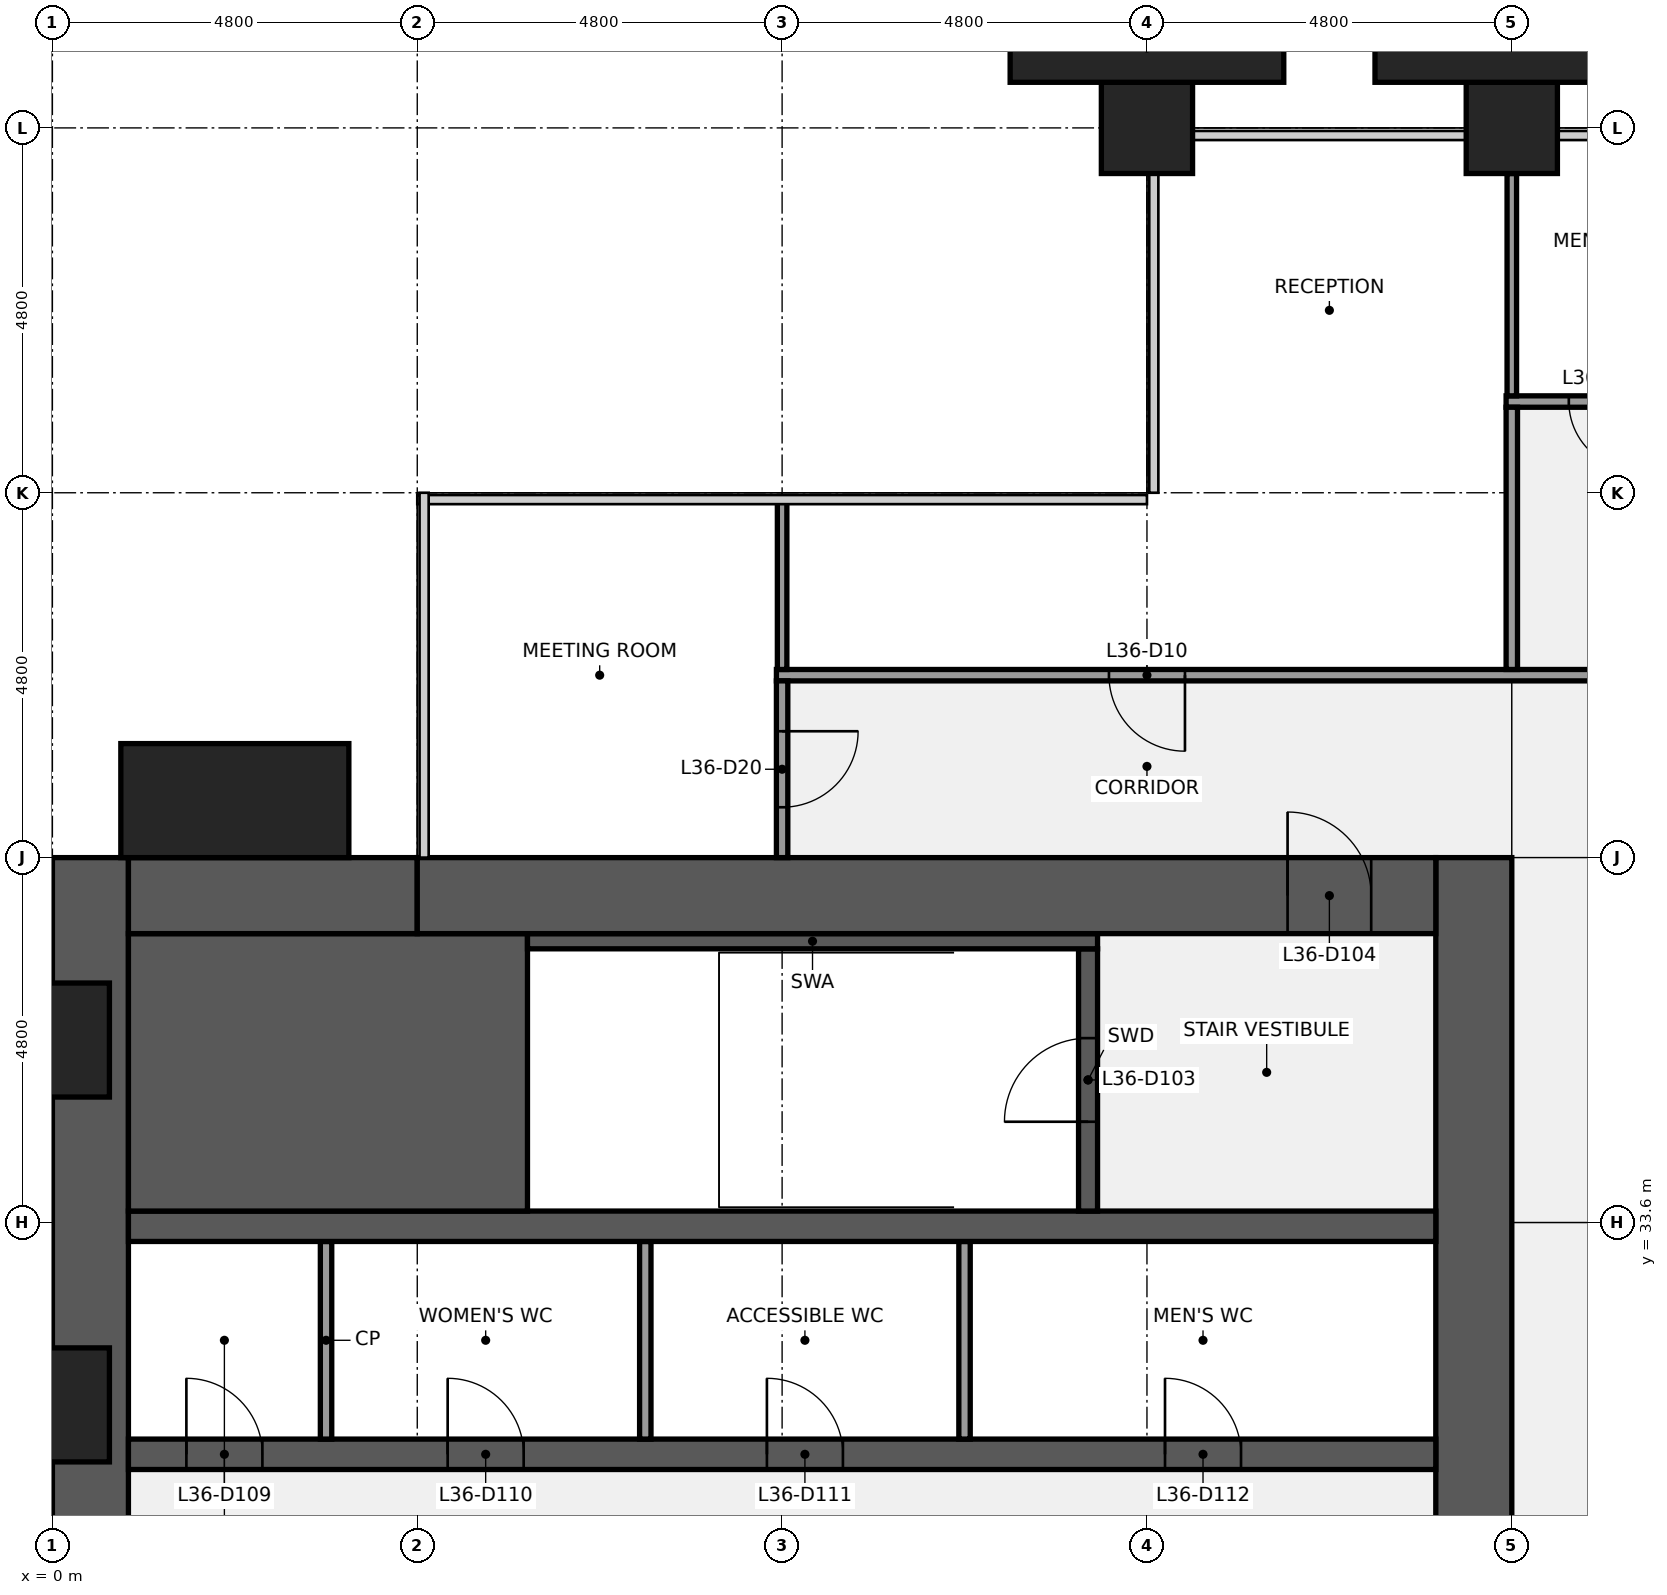
"""IFC4 building model, lengths in metres.
Left out: names, types, materials, properties, quantities, classifications, styles, units other than length and angle.
Written with IfcOpenShell. Run it as: python <this file> out.ifc"""

import sys

from ifc_helpers import new_model, si_unit, direction, frame, frame_2d, origin, origin_2d, place, context, subcontext, project, spatial, rectangle, extrude, element, fill, save


model = new_model("IFC4")
c1 = context("Model", 3, precision=1e-05, world=origin(), true_north=direction((0.0, 1.0)))
c2 = subcontext(c1, "Body", "Model", "MODEL_VIEW")
j1 = project(units=[si_unit("LENGTHUNIT", "METRE"), si_unit("PLANEANGLEUNIT", "RADIAN")], contexts=[c1])
p1 = place(None, origin())
s1 = spatial("IfcSite", under=j1, at=p1, CompositionType="ELEMENT")
p2 = place(p1, origin())
s2 = spatial("IfcBuilding", under=s1, at=p2, CompositionType="ELEMENT")
p3 = place(p2, frame((0.0, 0.0, 164.1)))
s3 = spatial("IfcBuildingStorey", under=s2, at=p3, CompositionType="ELEMENT", Elevation=164.1)
for number, where, z_axis, x_axis in (
    (1, (14.4, 48.0, 0.0), (0.0, 0.0, 1.0), (1.0, 0.0, 0.0)),
    (2, (19.2, 48.0, 0.0), (0.0, 0.0, 1.0), (1.0, 0.0, 0.0)),
):
    element("IfcColumn", number, at=place(p3, frame(where, z_axis=z_axis, x_axis=x_axis)), inside=s3, PredefinedType="COLUMN", context=c2, shape_type="SweptSolid", body=[
        extrude(rectangle(XDim=1.2, YDim=1.2, at=origin_2d()), origin(), (0.0, 0.0, 1.0), 4.0),
    ])
p4 = place(p3, frame((0.5, 9.6, 0.0), z_axis=(0.0, 0.0, 1.0), x_axis=(0.0, 1.0, 0.0)))
e3 = element("IfcWall", 3, at=p4, inside=s3, PredefinedType="SHEAR", context=c2, shape_type="SweptSolid", body=[
    extrude(rectangle(XDim=28.8, YDim=1.0, at=frame_2d((14.4, 0.0))), origin(), (0.0, 0.0, 1.0), 3.84),
])
p5 = place(p4, frame((8.85, 0.0, 0.9)))
e4 = element("IfcOpeningElement", 4, at=p5, cuts=e3, PredefinedType="OPENING", context=c2, shape_type="SweptSolid", body=[
    extrude(rectangle(XDim=1.5, YDim=1.5, at=frame_2d((0.75, 0.75))), frame((0.0, 0.51, 0.0), z_axis=(0.0, -1.0, 0.0), x_axis=(1.0, 0.0, 0.0)), (0.0, 0.0, 1.0), 1.02),
])
p6 = place(p4, frame((18.45, 0.0, 0.9)))
e5 = element("IfcOpeningElement", 5, at=p6, cuts=e3, PredefinedType="OPENING", context=c2, shape_type="SweptSolid", body=[
    extrude(rectangle(XDim=1.5, YDim=1.5, at=frame_2d((0.75, 0.75))), frame((0.0, 0.51, 0.0), z_axis=(0.0, -1.0, 0.0), x_axis=(1.0, 0.0, 0.0)), (0.0, 0.0, 1.0), 1.02),
])
p7 = place(p3, frame((18.7, 38.4, 0.0), z_axis=(0.0, 0.0, 1.0), x_axis=(0.0, -1.0, 0.0)))
e6 = element("IfcWall", 6, at=p7, inside=s3, PredefinedType="SHEAR", context=c2, shape_type="SweptSolid", body=[
    extrude(rectangle(XDim=28.8, YDim=1.0, at=frame_2d((14.4, 0.0))), origin(), (0.0, 0.0, 1.0), 3.84),
])
p8 = place(p7, frame((18.3, 0.0, 0.0)))
e7 = element("IfcOpeningElement", 7, at=p8, cuts=e6, PredefinedType="OPENING", context=c2, shape_type="SweptSolid", body=[
    extrude(rectangle(XDim=1.8, YDim=2.1, at=frame_2d((0.9, 1.05))), frame((0.0, 0.51, 0.0), z_axis=(0.0, -1.0, 0.0), x_axis=(1.0, 0.0, 0.0)), (0.0, 0.0, 1.0), 1.02),
])
p9 = place(p7, frame((8.7, 0.0, 0.0)))
e8 = element("IfcOpeningElement", 8, at=p9, cuts=e6, PredefinedType="OPENING", context=c2, shape_type="SweptSolid", body=[
    extrude(rectangle(XDim=1.8, YDim=2.1, at=frame_2d((0.9, 1.05))), frame((0.0, 0.51, 0.0), z_axis=(0.0, -1.0, 0.0), x_axis=(1.0, 0.0, 0.0)), (0.0, 0.0, 1.0), 1.02),
])
p10 = place(p3, frame((1.0, 30.55, 0.0), z_axis=(0.0, 0.0, 1.0), x_axis=(1.0, 0.0, 0.0)))
e9 = element("IfcWall", 9, at=p10, inside=s3, PredefinedType="SHEAR", context=c2, shape_type="SweptSolid", body=[
    extrude(rectangle(XDim=17.2, YDim=0.4, at=frame_2d((8.6, 0.0))), origin(), (0.0, 0.0, 1.0), 3.84),
])
p11 = place(p10, frame((0.762, 0.0, 0.0)))
e10 = element("IfcOpeningElement", 10, at=p11, cuts=e9, PredefinedType="OPENING", context=c2, shape_type="SweptSolid", body=[
    extrude(rectangle(XDim=1.0, YDim=2.1, at=frame_2d((0.5, 1.05))), frame((0.0, 0.21, 0.0), z_axis=(0.0, -1.0, 0.0), x_axis=(1.0, 0.0, 0.0)), (0.0, 0.0, 1.0), 0.42),
])
p12 = place(p10, frame((4.2, 0.0, 0.0)))
e11 = element("IfcOpeningElement", 11, at=p12, cuts=e9, PredefinedType="OPENING", context=c2, shape_type="SweptSolid", body=[
    extrude(rectangle(XDim=1.0, YDim=2.1, at=frame_2d((0.5, 1.05))), frame((0.0, 0.21, 0.0), z_axis=(0.0, -1.0, 0.0), x_axis=(1.0, 0.0, 0.0)), (0.0, 0.0, 1.0), 0.42),
])
p13 = place(p10, frame((8.4, 0.0, 0.0)))
e12 = element("IfcOpeningElement", 12, at=p13, cuts=e9, PredefinedType="OPENING", context=c2, shape_type="SweptSolid", body=[
    extrude(rectangle(XDim=1.0, YDim=2.1, at=frame_2d((0.5, 1.05))), frame((0.0, 0.21, 0.0), z_axis=(0.0, -1.0, 0.0), x_axis=(1.0, 0.0, 0.0)), (0.0, 0.0, 1.0), 0.42),
])
p14 = place(p10, frame((13.637, 0.0, 0.0)))
e13 = element("IfcOpeningElement", 13, at=p14, cuts=e9, PredefinedType="OPENING", context=c2, shape_type="SweptSolid", body=[
    extrude(rectangle(XDim=1.0, YDim=2.1, at=frame_2d((0.5, 1.05))), frame((0.0, 0.21, 0.0), z_axis=(0.0, -1.0, 0.0), x_axis=(1.0, 0.0, 0.0)), (0.0, 0.0, 1.0), 0.42),
])
for number, where, z_axis, x_axis in (
    (14, (3.6, 30.75, 0.0), (0.0, 0.0, 1.0), (0.0, 1.0, 0.0)),
    (15, (7.8, 30.75, 0.0), (0.0, 0.0, 1.0), (0.0, 1.0, 0.0)),
    (16, (12.0, 30.75, 0.0), (0.0, 0.0, 1.0), (0.0, 1.0, 0.0)),
):
    element("IfcWall", number, at=place(p3, frame(where, z_axis=z_axis, x_axis=x_axis)), inside=s3, PredefinedType="PARTITIONING", context=c2, shape_type="SweptSolid", body=[
        extrude(rectangle(XDim=2.6, YDim=0.15, at=frame_2d((1.3, 0.0))), origin(), (0.0, 0.0, 1.0), 3.84),
    ])
p15 = place(p3, frame((1.0, 33.55, 0.0), z_axis=(0.0, 0.0, 1.0), x_axis=(1.0, 0.0, 0.0)))
e17 = element("IfcWall", 17, at=p15, inside=s3, PredefinedType="SHEAR", context=c2, shape_type="SweptSolid", body=[
    extrude(rectangle(XDim=17.2, YDim=0.4, at=frame_2d((8.6, 0.0))), origin(), (0.0, 0.0, 1.0), 3.84),
])
p16 = place(p3, frame((1.0, 35.575, 0.0), z_axis=(0.0, 0.0, 1.0), x_axis=(1.0, 0.0, 0.0)))
e18 = element("IfcWall", 18, at=p16, inside=s3, PredefinedType="SHEAR", context=c2, shape_type="SweptSolid", body=[
    extrude(rectangle(XDim=5.25, YDim=3.65, at=frame_2d((2.625, 0.0))), origin(), (0.0, 0.0, 1.0), 3.84),
])
p17 = place(p3, frame((13.625, 33.75, 0.0), z_axis=(0.0, 0.0, 1.0), x_axis=(0.0, 1.0, 0.0)))
e19 = element("IfcWall", 19, at=p17, inside=s3, PredefinedType="SHEAR", context=c2, shape_type="SweptSolid", body=[
    extrude(rectangle(XDim=3.45, YDim=0.25, at=frame_2d((1.725, 0.0))), origin(), (0.0, 0.0, 1.0), 3.84),
])
p18 = place(p17, frame((1.175, 0.0, 0.0)))
e20 = element("IfcOpeningElement", 20, at=p18, cuts=e19, PredefinedType="OPENING", context=c2, shape_type="SweptSolid", body=[
    extrude(rectangle(XDim=1.1, YDim=2.1, at=frame_2d((0.55, 1.05))), frame((0.0, 0.135, 0.0), z_axis=(0.0, -1.0, 0.0), x_axis=(1.0, 0.0, 0.0)), (0.0, 0.0, 1.0), 0.27),
])
p19 = place(p3, frame((6.25, 37.3, 0.0), z_axis=(0.0, 0.0, 1.0), x_axis=(1.0, 0.0, 0.0)))
e21 = element("IfcWall", 21, at=p19, inside=s3, PredefinedType="SHEAR", context=c2, shape_type="SweptSolid", body=[
    extrude(rectangle(XDim=7.5, YDim=0.2, at=frame_2d((3.75, 0.0))), origin(), (0.0, 0.0, 1.0), 3.84),
])
p20 = place(p3, frame((1.0, 37.9, 0.0), z_axis=(0.0, 0.0, 1.0), x_axis=(1.0, 0.0, 0.0)))
e22 = element("IfcWall", 22, at=p20, inside=s3, PredefinedType="SHEAR", context=c2, shape_type="SweptSolid", body=[
    extrude(rectangle(XDim=3.8, YDim=1.0, at=frame_2d((1.9, 0.0))), origin(), (0.0, 0.0, 1.0), 3.84),
])
p21 = place(p3, frame((4.8, 37.9, 0.0), z_axis=(0.0, 0.0, 1.0), x_axis=(1.0, 0.0, 0.0)))
e23 = element("IfcWall", 23, at=p21, inside=s3, PredefinedType="SHEAR", context=c2, shape_type="SweptSolid", body=[
    extrude(rectangle(XDim=13.4, YDim=1.0, at=frame_2d((6.7, 0.0))), origin(), (0.0, 0.0, 1.0), 3.84),
])
p22 = place(p21, frame((11.45, 0.0, 0.0)))
e24 = element("IfcOpeningElement", 24, at=p22, cuts=e23, PredefinedType="OPENING", context=c2, shape_type="SweptSolid", body=[
    extrude(rectangle(XDim=1.1, YDim=2.1, at=frame_2d((0.55, 1.05))), frame((0.0, 0.51, 0.0), z_axis=(0.0, -1.0, 0.0), x_axis=(1.0, 0.0, 0.0)), (0.0, 0.0, 1.0), 1.02),
])
p23 = place(p3, frame((9.525, 40.8, 0.0), z_axis=(0.0, 0.0, 1.0), x_axis=(1.0, 0.0, 0.0)))
e25 = element("IfcWall", 25, at=p23, inside=s3, PredefinedType="PARTITIONING", context=c2, shape_type="SweptSolid", body=[
    extrude(rectangle(XDim=38.375, YDim=0.15, at=frame_2d((19.188, 0.0))), origin(), (0.0, 0.0, 1.0), 2.936),
])
p24 = place(p23, frame((4.375, 0.0, 0.0)))
e26 = element("IfcOpeningElement", 26, at=p24, cuts=e25, PredefinedType="OPENING", context=c2, shape_type="SweptSolid", body=[
    extrude(rectangle(XDim=1.0, YDim=2.1, at=frame_2d((0.5, 1.05))), frame((0.0, 0.085, 0.0), z_axis=(0.0, -1.0, 0.0), x_axis=(1.0, 0.0, 0.0)), (0.0, 0.0, 1.0), 0.17),
])
p25 = place(p23, frame((12.775, 0.0, 0.0)))
e27 = element("IfcOpeningElement", 27, at=p25, cuts=e25, PredefinedType="OPENING", context=c2, shape_type="SweptSolid", body=[
    extrude(rectangle(XDim=1.0, YDim=2.1, at=frame_2d((0.5, 1.05))), frame((0.0, 0.085, 0.0), z_axis=(0.0, -1.0, 0.0), x_axis=(1.0, 0.0, 0.0)), (0.0, 0.0, 1.0), 0.17),
])
p26 = place(p23, frame((17.575, 0.0, 0.0)))
e28 = element("IfcOpeningElement", 28, at=p26, cuts=e25, PredefinedType="OPENING", context=c2, shape_type="SweptSolid", body=[
    extrude(rectangle(XDim=1.0, YDim=2.1, at=frame_2d((0.5, 1.05))), frame((0.0, 0.085, 0.0), z_axis=(0.0, -1.0, 0.0), x_axis=(1.0, 0.0, 0.0)), (0.0, 0.0, 1.0), 0.17),
])
p27 = place(p23, frame((19.975, 0.0, 0.0)))
e29 = element("IfcOpeningElement", 29, at=p27, cuts=e25, PredefinedType="OPENING", context=c2, shape_type="SweptSolid", body=[
    extrude(rectangle(XDim=1.0, YDim=2.1, at=frame_2d((0.5, 1.05))), frame((0.0, 0.085, 0.0), z_axis=(0.0, -1.0, 0.0), x_axis=(1.0, 0.0, 0.0)), (0.0, 0.0, 1.0), 0.17),
])
p28 = place(p23, frame((23.575, 0.0, 0.0)))
e30 = element("IfcOpeningElement", 30, at=p28, cuts=e25, PredefinedType="OPENING", context=c2, shape_type="SweptSolid", body=[
    extrude(rectangle(XDim=1.0, YDim=2.1, at=frame_2d((0.5, 1.05))), frame((0.0, 0.085, 0.0), z_axis=(0.0, -1.0, 0.0), x_axis=(1.0, 0.0, 0.0)), (0.0, 0.0, 1.0), 0.17),
])
p29 = place(p23, frame((27.175, 0.0, 0.0)))
e31 = element("IfcOpeningElement", 31, at=p29, cuts=e25, PredefinedType="OPENING", context=c2, shape_type="SweptSolid", body=[
    extrude(rectangle(XDim=1.0, YDim=2.1, at=frame_2d((0.5, 1.05))), frame((0.0, 0.085, 0.0), z_axis=(0.0, -1.0, 0.0), x_axis=(1.0, 0.0, 0.0)), (0.0, 0.0, 1.0), 0.17),
])
p30 = place(p23, frame((33.125, 0.0, 0.0)))
e32 = element("IfcOpeningElement", 32, at=p30, cuts=e25, PredefinedType="OPENING", context=c2, shape_type="SweptSolid", body=[
    extrude(rectangle(XDim=1.0, YDim=2.1, at=frame_2d((0.5, 1.05))), frame((0.0, 0.085, 0.0), z_axis=(0.0, -1.0, 0.0), x_axis=(1.0, 0.0, 0.0)), (0.0, 0.0, 1.0), 0.17),
])
p31 = place(p3, frame((19.125, 44.4, 0.0), z_axis=(0.0, 0.0, 1.0), x_axis=(1.0, 0.0, 0.0)))
e33 = element("IfcWall", 33, at=p31, inside=s3, PredefinedType="PARTITIONING", context=c2, shape_type="SweptSolid", body=[
    extrude(rectangle(XDim=7.35, YDim=0.15, at=frame_2d((3.675, 0.0))), origin(), (0.0, 0.0, 1.0), 2.936),
])
p32 = place(p31, frame((0.825, 0.0, 0.0)))
e34 = element("IfcOpeningElement", 34, at=p32, cuts=e33, PredefinedType="OPENING", context=c2, shape_type="SweptSolid", body=[
    extrude(rectangle(XDim=0.9, YDim=2.1, at=frame_2d((0.45, 1.05))), frame((0.0, 0.085, 0.0), z_axis=(0.0, -1.0, 0.0), x_axis=(1.0, 0.0, 0.0)), (0.0, 0.0, 1.0), 0.17),
])
p33 = place(p31, frame((3.225, 0.0, 0.0)))
e35 = element("IfcOpeningElement", 35, at=p33, cuts=e33, PredefinedType="OPENING", context=c2, shape_type="SweptSolid", body=[
    extrude(rectangle(XDim=0.9, YDim=2.1, at=frame_2d((0.45, 1.05))), frame((0.0, 0.085, 0.0), z_axis=(0.0, -1.0, 0.0), x_axis=(1.0, 0.0, 0.0)), (0.0, 0.0, 1.0), 0.17),
])
p34 = place(p31, frame((5.475, 0.0, 0.0)))
e36 = element("IfcOpeningElement", 36, at=p34, cuts=e33, PredefinedType="OPENING", context=c2, shape_type="SweptSolid", body=[
    extrude(rectangle(XDim=1.2, YDim=2.1, at=frame_2d((0.6, 1.05))), frame((0.0, 0.085, 0.0), z_axis=(0.0, -1.0, 0.0), x_axis=(1.0, 0.0, 0.0)), (0.0, 0.0, 1.0), 0.17),
])
p35 = place(p3, frame((9.6, 40.875, 0.0), z_axis=(0.0, 0.0, 1.0), x_axis=(0.0, 1.0, 0.0)))
e37 = element("IfcWall", 37, at=p35, inside=s3, PredefinedType="PARTITIONING", context=c2, shape_type="SweptSolid", body=[
    extrude(rectangle(XDim=2.225, YDim=0.125, at=frame_2d((1.113, 0.0))), origin(), (0.0, 0.0, 1.0), 2.936),
])
p36 = place(p3, frame((9.6, 38.4, 0.0), z_axis=(0.0, 0.0, 1.0), x_axis=(0.0, 1.0, 0.0)))
e38 = element("IfcWall", 38, at=p36, inside=s3, PredefinedType="PARTITIONING", context=c2, shape_type="SweptSolid", body=[
    extrude(rectangle(XDim=2.325, YDim=0.15, at=frame_2d((1.163, 0.0))), origin(), (0.0, 0.0, 1.0), 2.936),
])
p37 = place(p36, frame((0.663, 0.0, 0.0)))
e39 = element("IfcOpeningElement", 39, at=p37, cuts=e38, PredefinedType="OPENING", context=c2, shape_type="SweptSolid", body=[
    extrude(rectangle(XDim=1.0, YDim=2.1, at=frame_2d((0.5, 1.05))), frame((0.0, 0.085, 0.0), z_axis=(0.0, -1.0, 0.0), x_axis=(1.0, 0.0, 0.0)), (0.0, 0.0, 1.0), 0.17),
])
p38 = place(p3, frame((19.2, 44.475, 0.0), z_axis=(0.0, 0.0, 1.0), x_axis=(0.0, 1.0, 0.0)))
e40 = element("IfcWall", 40, at=p38, inside=s3, PredefinedType="PARTITIONING", context=c2, shape_type="SweptSolid", body=[
    extrude(rectangle(XDim=2.925, YDim=0.125, at=frame_2d((1.462, 0.0))), origin(), (0.0, 0.0, 1.0), 2.936),
])
p39 = place(p3, frame((19.2, 40.875, 0.0), z_axis=(0.0, 0.0, 1.0), x_axis=(0.0, 1.0, 0.0)))
e41 = element("IfcWall", 41, at=p39, inside=s3, PredefinedType="PARTITIONING", context=c2, shape_type="SweptSolid", body=[
    extrude(rectangle(XDim=3.45, YDim=0.15, at=frame_2d((1.725, 0.0))), origin(), (0.0, 0.0, 1.0), 2.936),
])
p40 = place(p3, frame((2.4, 39.15, 0.0), z_axis=(0.0, 0.0, 1.0), x_axis=(1.0, 0.0, 0.0)))
e42 = element("IfcColumn", 42, at=p40, inside=s3, PredefinedType="PILASTER", context=c2, shape_type="SweptSolid", body=[
    extrude(rectangle(XDim=3.0, YDim=1.5, at=origin_2d()), origin(), (0.0, 0.0, 1.0), 4.0),
])
for number, where, z_axis, x_axis in (
    (43, (14.4, 49.05, 0.0), (0.0, 0.0, 1.0), (1.0, 0.0, 0.0)),
    (44, (19.2, 49.05, 0.0), (0.0, 0.0, 1.0), (1.0, 0.0, 0.0)),
):
    element("IfcColumn", number, at=place(p3, frame(where, z_axis=z_axis, x_axis=x_axis)), inside=s3, PredefinedType="PILASTER", context=c2, shape_type="SweptSolid", body=[
        extrude(rectangle(XDim=3.6, YDim=0.9, at=origin_2d()), origin(), (0.0, 0.0, 1.0), 4.0),
    ])
p41 = place(p18, origin())
e45 = element("IfcDoor", 45, at=p41, inside=s3, OperationType="SINGLE_SWING_LEFT", PredefinedType="DOOR", context=c2, shape_type="SweptSolid", body=[
    extrude(rectangle(XDim=1.1, YDim=2.1, at=frame_2d((0.55, 1.05))), frame((0.0, 0.025, 0.0), z_axis=(0.0, -1.0, 0.0), x_axis=(1.0, 0.0, 0.0)), (0.0, 0.0, 1.0), 0.05),
])
fill(e20, e45)
p42 = place(p22, origin())
e46 = element("IfcDoor", 46, at=p42, inside=s3, OperationType="SINGLE_SWING_LEFT", PredefinedType="DOOR", context=c2, shape_type="SweptSolid", body=[
    extrude(rectangle(XDim=1.1, YDim=2.1, at=frame_2d((0.55, 1.05))), frame((0.0, 0.025, 0.0), z_axis=(0.0, -1.0, 0.0), x_axis=(1.0, 0.0, 0.0)), (0.0, 0.0, 1.0), 0.05),
])
fill(e24, e46)
p43 = place(p11, origin())
e47 = element("IfcDoor", 47, at=p43, inside=s3, OperationType="SINGLE_SWING_LEFT", PredefinedType="DOOR", context=c2, shape_type="SweptSolid", body=[
    extrude(rectangle(XDim=1.0, YDim=2.1, at=frame_2d((0.5, 1.05))), frame((0.0, 0.025, 0.0), z_axis=(0.0, -1.0, 0.0), x_axis=(1.0, 0.0, 0.0)), (0.0, 0.0, 1.0), 0.05),
])
fill(e10, e47)
p44 = place(p12, origin())
e48 = element("IfcDoor", 48, at=p44, inside=s3, OperationType="SINGLE_SWING_LEFT", PredefinedType="DOOR", context=c2, shape_type="SweptSolid", body=[
    extrude(rectangle(XDim=1.0, YDim=2.1, at=frame_2d((0.5, 1.05))), frame((0.0, 0.025, 0.0), z_axis=(0.0, -1.0, 0.0), x_axis=(1.0, 0.0, 0.0)), (0.0, 0.0, 1.0), 0.05),
])
fill(e11, e48)
p45 = place(p13, origin())
e49 = element("IfcDoor", 49, at=p45, inside=s3, OperationType="SINGLE_SWING_LEFT", PredefinedType="DOOR", context=c2, shape_type="SweptSolid", body=[
    extrude(rectangle(XDim=1.0, YDim=2.1, at=frame_2d((0.5, 1.05))), frame((0.0, 0.025, 0.0), z_axis=(0.0, -1.0, 0.0), x_axis=(1.0, 0.0, 0.0)), (0.0, 0.0, 1.0), 0.05),
])
fill(e12, e49)
p46 = place(p14, origin())
e50 = element("IfcDoor", 50, at=p46, inside=s3, OperationType="SINGLE_SWING_LEFT", PredefinedType="DOOR", context=c2, shape_type="SweptSolid", body=[
    extrude(rectangle(XDim=1.0, YDim=2.1, at=frame_2d((0.5, 1.05))), frame((0.0, 0.025, 0.0), z_axis=(0.0, -1.0, 0.0), x_axis=(1.0, 0.0, 0.0)), (0.0, 0.0, 1.0), 0.05),
])
fill(e13, e50)
p47 = place(p24, origin())
e51 = element("IfcDoor", 51, at=p47, inside=s3, OperationType="SINGLE_SWING_RIGHT", PredefinedType="DOOR", context=c2, shape_type="SweptSolid", body=[
    extrude(rectangle(XDim=1.0, YDim=2.1, at=frame_2d((0.5, 1.05))), frame((0.0, 0.025, 0.0), z_axis=(0.0, -1.0, 0.0), x_axis=(1.0, 0.0, 0.0)), (0.0, 0.0, 1.0), 0.05),
])
fill(e26, e51)
p48 = place(p32, origin())
e52 = element("IfcDoor", 52, at=p48, inside=s3, OperationType="SINGLE_SWING_RIGHT", PredefinedType="DOOR", context=c2, shape_type="SweptSolid", body=[
    extrude(rectangle(XDim=0.9, YDim=2.1, at=frame_2d((0.45, 1.05))), frame((0.0, 0.025, 0.0), z_axis=(0.0, -1.0, 0.0), x_axis=(1.0, 0.0, 0.0)), (0.0, 0.0, 1.0), 0.05),
])
fill(e34, e52)
p49 = place(p37, origin())
e53 = element("IfcDoor", 53, at=p49, inside=s3, OperationType="SINGLE_SWING_RIGHT", PredefinedType="DOOR", context=c2, shape_type="SweptSolid", body=[
    extrude(rectangle(XDim=1.0, YDim=2.1, at=frame_2d((0.5, 1.05))), frame((0.0, 0.025, 0.0), z_axis=(0.0, -1.0, 0.0), x_axis=(1.0, 0.0, 0.0)), (0.0, 0.0, 1.0), 0.05),
])
fill(e39, e53)
save(model, sys.argv[1])
